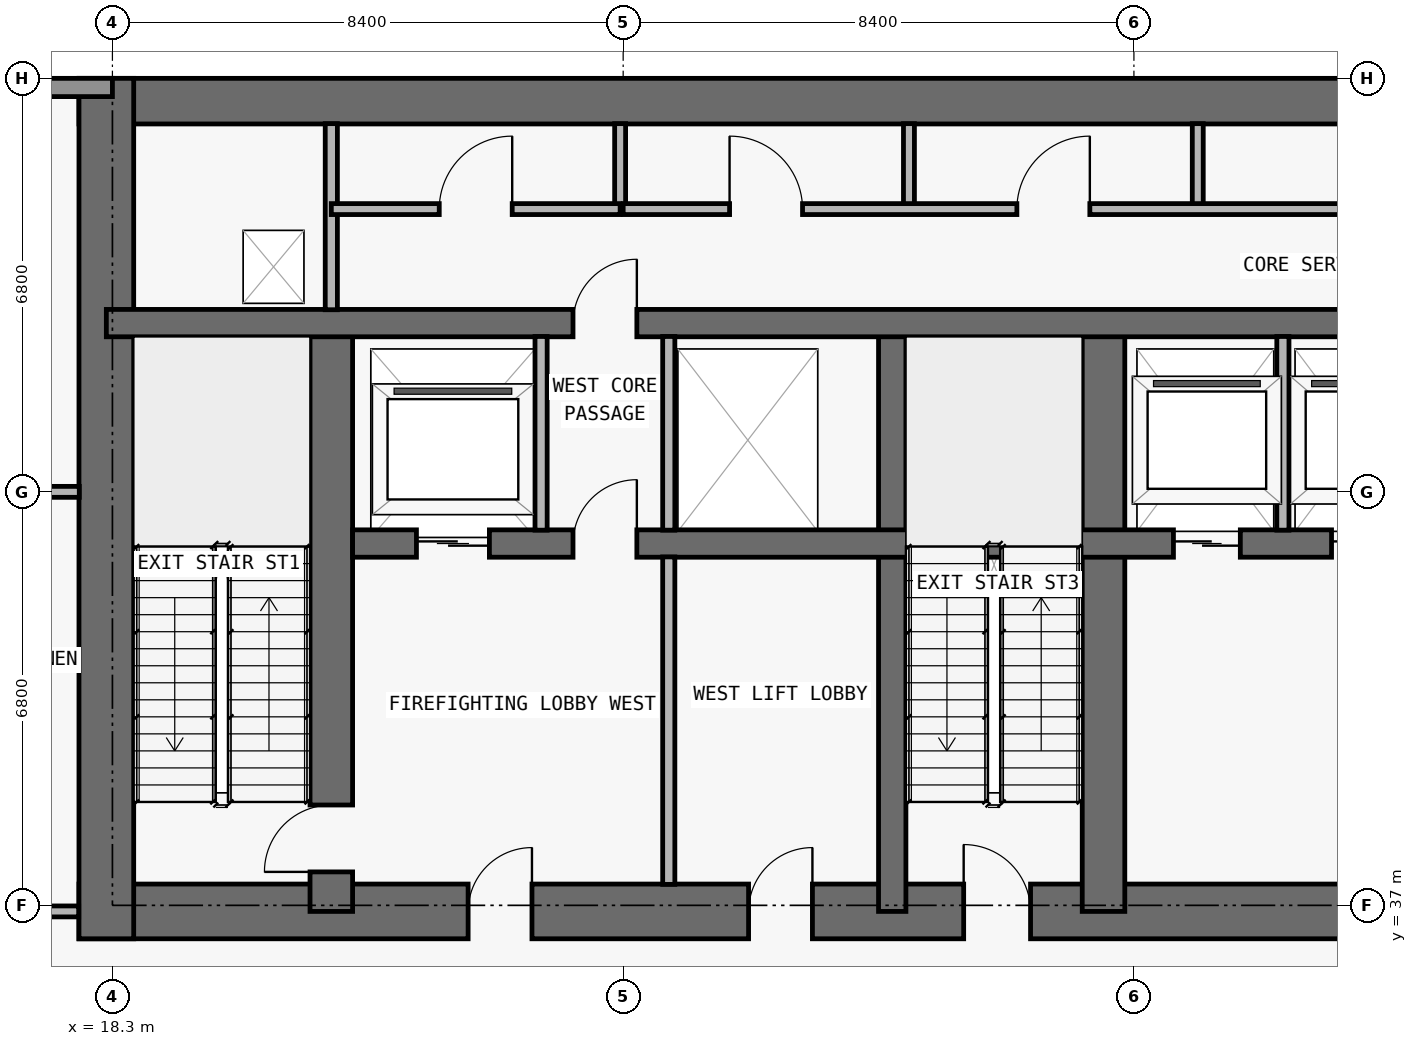
"""IFC4 building model, lengths in metres.
Left out: names, types, materials, properties, quantities, classifications, styles, units other than length and angle.
Written with IfcOpenShell. Run it as: python <this file> out.ifc"""

import sys

from ifc_helpers import new_model, si_unit, direction, frame, frame_2d, origin, place, context, subcontext, project, spatial, rectangle, extrude, element, fill, save


model = new_model("IFC4")
c1 = context("Model", 3, precision=1e-05, world=origin(), true_north=direction((0.0, 1.0)))
c2 = subcontext(c1, "Body", "Model", "MODEL_VIEW")
j1 = project(units=[si_unit("LENGTHUNIT", "METRE"), si_unit("PLANEANGLEUNIT", "RADIAN")], contexts=[c1])
p1 = place(None, origin())
s1 = spatial("IfcSite", under=j1, at=p1, CompositionType="ELEMENT")
p2 = place(p1, origin())
s2 = spatial("IfcBuilding", under=s1, at=p2, CompositionType="ELEMENT")
p3 = place(p2, frame((0.0, 0.0, 24.6)))
s3 = spatial("IfcBuildingStorey", under=s2, at=p3, CompositionType="ELEMENT", Elevation=24.6)
p4 = place(p3, frame((17.75, 36.9, 0.0), z_axis=(0.0, 0.0, 1.0), x_axis=(1.0, 0.0, 0.0)))
e1 = element("IfcWall", 1, at=p4, inside=s3, PredefinedType="SHEAR", context=c2, shape_type="SweptSolid", body=[
    extrude(rectangle(XDim=42.3, YDim=0.9, at=frame_2d((21.15, 0.0))), origin(), (0.0, 0.0, 1.0), 5.15),
])
p5 = place(p4, frame((14.55, 0.0, 0.0)))
e2 = element("IfcOpeningElement", 2, at=p5, cuts=e1, PredefinedType="OPENING", context=c2, shape_type="SweptSolid", body=[
    extrude(rectangle(XDim=1.1, YDim=2.15, at=frame_2d((0.55, 1.075))), frame((0.0, 0.46, 0.0), z_axis=(0.0, -1.0, 0.0), x_axis=(1.0, 0.0, 0.0)), (0.0, 0.0, 1.0), 0.92),
])
p6 = place(p4, frame((6.4, 0.0, 0.0)))
e3 = element("IfcOpeningElement", 3, at=p6, cuts=e1, PredefinedType="OPENING", context=c2, shape_type="SweptSolid", body=[
    extrude(rectangle(XDim=1.05, YDim=2.15, at=frame_2d((0.525, 1.075))), frame((0.0, 0.46, 0.0), z_axis=(0.0, -1.0, 0.0), x_axis=(1.0, 0.0, 0.0)), (0.0, 0.0, 1.0), 0.92),
])
p7 = place(p4, frame((34.9, 0.0, 0.0)))
e4 = element("IfcOpeningElement", 4, at=p7, cuts=e1, PredefinedType="OPENING", context=c2, shape_type="SweptSolid", body=[
    extrude(rectangle(XDim=1.05, YDim=2.15, at=frame_2d((0.525, 1.075))), frame((0.0, 0.46, 0.0), z_axis=(0.0, -1.0, 0.0), x_axis=(1.0, 0.0, 0.0)), (0.0, 0.0, 1.0), 0.92),
])
p8 = place(p4, frame((11.012, 0.0, 0.0)))
e5 = element("IfcOpeningElement", 5, at=p8, cuts=e1, PredefinedType="OPENING", context=c2, shape_type="SweptSolid", body=[
    extrude(rectangle(XDim=1.05, YDim=2.15, at=frame_2d((0.525, 1.075))), frame((0.0, 0.46, 0.0), z_axis=(0.0, -1.0, 0.0), x_axis=(1.0, 0.0, 0.0)), (0.0, 0.0, 1.0), 0.92),
])
p9 = place(p4, frame((24.25, 0.0, 0.0)))
e6 = element("IfcOpeningElement", 6, at=p9, cuts=e1, PredefinedType="OPENING", context=c2, shape_type="SweptSolid", body=[
    extrude(rectangle(XDim=1.05, YDim=2.15, at=frame_2d((0.525, 1.075))), frame((0.0, 0.46, 0.0), z_axis=(0.0, -1.0, 0.0), x_axis=(1.0, 0.0, 0.0)), (0.0, 0.0, 1.0), 0.92),
])
p10 = place(p3, frame((17.75, 50.225, 0.0), z_axis=(0.0, 0.0, 1.0), x_axis=(1.0, 0.0, 0.0)))
e7 = element("IfcWall", 7, at=p10, inside=s3, PredefinedType="SHEAR", context=c2, shape_type="SweptSolid", body=[
    extrude(rectangle(XDim=42.3, YDim=0.75, at=frame_2d((21.15, 0.0))), origin(), (0.0, 0.0, 1.0), 5.15),
])
p11 = place(p3, frame((18.2, 36.45, 0.0), z_axis=(0.0, 0.0, 1.0), x_axis=(0.0, 1.0, 0.0)))
e8 = element("IfcWall", 8, at=p11, inside=s3, PredefinedType="SHEAR", context=c2, shape_type="SweptSolid", body=[
    extrude(rectangle(XDim=14.15, YDim=0.9, at=frame_2d((7.075, 0.0))), origin(), (0.0, 0.0, 1.0), 5.15),
])
p12 = place(p3, frame((21.9, 36.9, 0.0), z_axis=(0.0, 0.0, 1.0), x_axis=(0.0, 1.0, 0.0)))
e9 = element("IfcWall", 9, at=p12, inside=s3, PredefinedType="SHEAR", context=c2, shape_type="SweptSolid", body=[
    extrude(rectangle(XDim=9.675, YDim=0.7, at=frame_2d((4.837, 0.0))), origin(), (0.0, 0.0, 1.0), 5.15),
])
p13 = place(p12, frame((0.65, 0.0, 0.0)))
e10 = element("IfcOpeningElement", 10, at=p13, cuts=e9, PredefinedType="OPENING", context=c2, shape_type="SweptSolid", body=[
    extrude(rectangle(XDim=1.1, YDim=2.15, at=frame_2d((0.55, 1.075))), frame((0.0, 0.36, 0.0), z_axis=(0.0, -1.0, 0.0), x_axis=(1.0, 0.0, 0.0)), (0.0, 0.0, 1.0), 0.72),
])
p14 = place(p3, frame((31.125, 36.9, 0.0), z_axis=(0.0, 0.0, 1.0), x_axis=(0.0, 1.0, 0.0)))
e11 = element("IfcWall", 11, at=p14, inside=s3, PredefinedType="SHEAR", context=c2, shape_type="SweptSolid", body=[
    extrude(rectangle(XDim=9.675, YDim=0.45, at=frame_2d((4.837, 0.0))), origin(), (0.0, 0.0, 1.0), 5.15),
])
p15 = place(p3, frame((34.6, 36.9, 0.0), z_axis=(0.0, 0.0, 1.0), x_axis=(0.0, 1.0, 0.0)))
e12 = element("IfcWall", 12, at=p15, inside=s3, PredefinedType="SHEAR", context=c2, shape_type="SweptSolid", body=[
    extrude(rectangle(XDim=9.675, YDim=0.7, at=frame_2d((4.837, 0.0))), origin(), (0.0, 0.0, 1.0), 5.15),
])
p16 = place(p3, frame((22.25, 42.95, 0.0), z_axis=(0.0, 0.0, 1.0), x_axis=(1.0, 0.0, 0.0)))
e13 = element("IfcWall", 13, at=p16, inside=s3, PredefinedType="SHEAR", context=c2, shape_type="SweptSolid", body=[
    extrude(rectangle(XDim=33.3, YDim=0.45, at=frame_2d((16.65, 0.0))), origin(), (0.0, 0.0, 1.0), 5.15),
])
p17 = place(p16, frame((1.05, 0.0, 0.0)))
e14 = element("IfcOpeningElement", 14, at=p17, cuts=e13, PredefinedType="OPENING", context=c2, shape_type="SweptSolid", body=[
    extrude(rectangle(XDim=1.2, YDim=2.2, at=frame_2d((0.6, 1.1))), frame((0.0, 0.235, 0.0), z_axis=(0.0, -1.0, 0.0), x_axis=(1.0, 0.0, 0.0)), (0.0, 0.0, 1.0), 0.47),
])
p18 = place(p16, frame((31.05, 0.0, 0.0)))
e15 = element("IfcOpeningElement", 15, at=p18, cuts=e13, PredefinedType="OPENING", context=c2, shape_type="SweptSolid", body=[
    extrude(rectangle(XDim=1.2, YDim=2.2, at=frame_2d((0.6, 1.1))), frame((0.0, 0.235, 0.0), z_axis=(0.0, -1.0, 0.0), x_axis=(1.0, 0.0, 0.0)), (0.0, 0.0, 1.0), 0.47),
])
p19 = place(p16, frame((13.5, 0.0, 0.0)))
e16 = element("IfcOpeningElement", 16, at=p19, cuts=e13, PredefinedType="OPENING", context=c2, shape_type="SweptSolid", body=[
    extrude(rectangle(XDim=1.1, YDim=2.2, at=frame_2d((0.55, 1.1))), frame((0.0, 0.235, 0.0), z_axis=(0.0, -1.0, 0.0), x_axis=(1.0, 0.0, 0.0)), (0.0, 0.0, 1.0), 0.47),
])
p20 = place(p16, frame((16.1, 0.0, 0.0)))
e17 = element("IfcOpeningElement", 17, at=p20, cuts=e13, PredefinedType="OPENING", context=c2, shape_type="SweptSolid", body=[
    extrude(rectangle(XDim=1.1, YDim=2.2, at=frame_2d((0.55, 1.1))), frame((0.0, 0.235, 0.0), z_axis=(0.0, -1.0, 0.0), x_axis=(1.0, 0.0, 0.0)), (0.0, 0.0, 1.0), 0.47),
])
p21 = place(p16, frame((18.7, 0.0, 0.0)))
e18 = element("IfcOpeningElement", 18, at=p21, cuts=e13, PredefinedType="OPENING", context=c2, shape_type="SweptSolid", body=[
    extrude(rectangle(XDim=1.1, YDim=2.2, at=frame_2d((0.55, 1.1))), frame((0.0, 0.235, 0.0), z_axis=(0.0, -1.0, 0.0), x_axis=(1.0, 0.0, 0.0)), (0.0, 0.0, 1.0), 0.47),
])
p22 = place(p16, frame((3.625, 0.0, 0.0)))
e19 = element("IfcOpeningElement", 19, at=p22, cuts=e13, PredefinedType="OPENING", context=c2, shape_type="SweptSolid", body=[
    extrude(rectangle(XDim=1.05, YDim=2.15, at=frame_2d((0.525, 1.075))), frame((0.0, 0.235, 0.0), z_axis=(0.0, -1.0, 0.0), x_axis=(1.0, 0.0, 0.0)), (0.0, 0.0, 1.0), 0.47),
])
p23 = place(p16, frame((28.675, 0.0, 0.0)))
e20 = element("IfcOpeningElement", 20, at=p23, cuts=e13, PredefinedType="OPENING", context=c2, shape_type="SweptSolid", body=[
    extrude(rectangle(XDim=1.05, YDim=2.15, at=frame_2d((0.525, 1.075))), frame((0.0, 0.235, 0.0), z_axis=(0.0, -1.0, 0.0), x_axis=(1.0, 0.0, 0.0)), (0.0, 0.0, 1.0), 0.47),
])
p24 = place(p3, frame((18.2, 46.575, 0.0), z_axis=(0.0, 0.0, 1.0), x_axis=(1.0, 0.0, 0.0)))
e21 = element("IfcWall", 21, at=p24, inside=s3, PredefinedType="SHEAR", context=c2, shape_type="SweptSolid", body=[
    extrude(rectangle(XDim=41.4, YDim=0.45, at=frame_2d((20.7, 0.0))), origin(), (0.0, 0.0, 1.0), 5.15),
])
p25 = place(p24, frame((7.675, 0.0, 0.0)))
e22 = element("IfcOpeningElement", 22, at=p25, cuts=e21, PredefinedType="OPENING", context=c2, shape_type="SweptSolid", body=[
    extrude(rectangle(XDim=1.05, YDim=2.15, at=frame_2d((0.525, 1.075))), frame((0.0, 0.235, 0.0), z_axis=(0.0, -1.0, 0.0), x_axis=(1.0, 0.0, 0.0)), (0.0, 0.0, 1.0), 0.47),
])
p26 = place(p24, frame((32.725, 0.0, 0.0)))
e23 = element("IfcOpeningElement", 23, at=p26, cuts=e21, PredefinedType="OPENING", context=c2, shape_type="SweptSolid", body=[
    extrude(rectangle(XDim=1.05, YDim=2.15, at=frame_2d((0.525, 1.075))), frame((0.0, 0.235, 0.0), z_axis=(0.0, -1.0, 0.0), x_axis=(1.0, 0.0, 0.0)), (0.0, 0.0, 1.0), 0.47),
])
p27 = place(p3, frame((5.1, 50.45, 0.0), z_axis=(0.0, 0.0, 1.0), x_axis=(1.0, 0.0, 0.0)))
e24 = element("IfcWall", 24, at=p27, inside=s3, PredefinedType="STANDARD", context=c2, shape_type="SweptSolid", body=[
    extrude(rectangle(XDim=13.2, YDim=0.3, at=frame_2d((6.6, 0.0))), origin(), (0.0, 0.0, 1.0), 5.15),
])
p28 = place(p27, frame((5.5, 0.0, 0.85)))
e25 = element("IfcOpeningElement", 25, at=p28, cuts=e24, PredefinedType="OPENING", context=c2, shape_type="SweptSolid", body=[
    extrude(rectangle(XDim=2.2, YDim=1.55, at=frame_2d((1.1, 0.775))), frame((0.0, 0.16, 0.0), z_axis=(0.0, -1.0, 0.0), x_axis=(1.0, 0.0, 0.0)), (0.0, 0.0, 1.0), 0.32),
])
p29 = place(p3, frame((21.9, 46.795, 0.0), z_axis=(0.0, 0.0, 1.0), x_axis=(0.0, 1.0, 0.0)))
e26 = element("IfcWall", 26, at=p29, inside=s3, PredefinedType="PARTITIONING", context=c2, shape_type="SweptSolid", body=[
    extrude(rectangle(XDim=3.06, YDim=0.2, at=frame_2d((1.53, 0.0))), origin(), (0.0, 0.0, 1.0), 5.15),
])
p30 = place(p3, frame((25.35, 43.17, 0.0), z_axis=(0.0, 0.0, 1.0), x_axis=(0.0, 1.0, 0.0)))
e27 = element("IfcWall", 27, at=p30, inside=s3, PredefinedType="PARTITIONING", context=c2, shape_type="SweptSolid", body=[
    extrude(rectangle(XDim=3.185, YDim=0.2, at=frame_2d((1.593, 0.0))), origin(), (0.0, 0.0, 1.0), 5.15),
])
p31 = place(p3, frame((26.65, 48.45, 0.0), z_axis=(0.0, 0.0, 1.0), x_axis=(0.0, 1.0, 0.0)))
e28 = element("IfcWall", 28, at=p31, inside=s3, PredefinedType="PARTITIONING", context=c2, shape_type="SweptSolid", body=[
    extrude(rectangle(XDim=1.405, YDim=0.18, at=frame_2d((0.703, 0.0))), origin(), (0.0, 0.0, 1.0), 5.15),
])
p32 = place(p3, frame((27.45, 37.345, 0.0), z_axis=(0.0, 0.0, 1.0), x_axis=(0.0, 1.0, 0.0)))
e29 = element("IfcWall", 29, at=p32, inside=s3, PredefinedType="PARTITIONING", context=c2, shape_type="SweptSolid", body=[
    extrude(rectangle(XDim=5.385, YDim=0.2, at=frame_2d((2.692, 0.0))), origin(), (0.0, 0.0, 1.0), 5.15),
])
p33 = place(p3, frame((27.45, 43.17, 0.0), z_axis=(0.0, 0.0, 1.0), x_axis=(0.0, 1.0, 0.0)))
e30 = element("IfcWall", 30, at=p33, inside=s3, PredefinedType="PARTITIONING", context=c2, shape_type="SweptSolid", body=[
    extrude(rectangle(XDim=3.185, YDim=0.2, at=frame_2d((1.593, 0.0))), origin(), (0.0, 0.0, 1.0), 5.15),
])
for number, where, z_axis, x_axis in (
    (31, (31.4, 48.45, 0.0), (0.0, 0.0, 1.0), (0.0, 1.0, 0.0)),
    (32, (36.15, 48.45, 0.0), (0.0, 0.0, 1.0), (0.0, 1.0, 0.0)),
):
    element("IfcWall", number, at=place(p3, frame(where, z_axis=z_axis, x_axis=x_axis)), inside=s3, PredefinedType="PARTITIONING", context=c2, shape_type="SweptSolid", body=[
        extrude(rectangle(XDim=1.405, YDim=0.18, at=frame_2d((0.703, 0.0))), origin(), (0.0, 0.0, 1.0), 5.15),
    ])
p34 = place(p3, frame((37.55, 43.17, 0.0), z_axis=(0.0, 0.0, 1.0), x_axis=(0.0, 1.0, 0.0)))
e33 = element("IfcWall", 33, at=p34, inside=s3, PredefinedType="PARTITIONING", context=c2, shape_type="SweptSolid", body=[
    extrude(rectangle(XDim=3.185, YDim=0.2, at=frame_2d((1.593, 0.0))), origin(), (0.0, 0.0, 1.0), 5.15),
])
p35 = place(p3, frame((5.1, 36.9, 0.0), z_axis=(0.0, 0.0, 1.0), x_axis=(1.0, 0.0, 0.0)))
e34 = element("IfcWall", 34, at=p35, inside=s3, PredefinedType="PARTITIONING", context=c2, shape_type="SweptSolid", body=[
    extrude(rectangle(XDim=12.645, YDim=0.18, at=frame_2d((6.323, 0.0))), origin(), (0.0, 0.0, 1.0), 5.15),
])
p36 = place(p35, frame((1.975, 0.0, 0.0)))
e35 = element("IfcOpeningElement", 35, at=p36, cuts=e34, PredefinedType="OPENING", context=c2, shape_type="SweptSolid", body=[
    extrude(rectangle(XDim=0.85, YDim=2.1, at=frame_2d((0.425, 1.05))), frame((0.0, 0.1, 0.0), z_axis=(0.0, -1.0, 0.0), x_axis=(1.0, 0.0, 0.0)), (0.0, 0.0, 1.0), 0.2),
])
p37 = place(p35, frame((6.525, 0.0, 0.0)))
e36 = element("IfcOpeningElement", 36, at=p37, cuts=e34, PredefinedType="OPENING", context=c2, shape_type="SweptSolid", body=[
    extrude(rectangle(XDim=0.85, YDim=2.1, at=frame_2d((0.425, 1.05))), frame((0.0, 0.1, 0.0), z_axis=(0.0, -1.0, 0.0), x_axis=(1.0, 0.0, 0.0)), (0.0, 0.0, 1.0), 0.2),
])
p38 = place(p35, frame((10.423, 0.0, 0.0)))
e37 = element("IfcOpeningElement", 37, at=p38, cuts=e34, PredefinedType="OPENING", context=c2, shape_type="SweptSolid", body=[
    extrude(rectangle(XDim=0.9, YDim=2.15, at=frame_2d((0.45, 1.075))), frame((0.0, 0.1, 0.0), z_axis=(0.0, -1.0, 0.0), x_axis=(1.0, 0.0, 0.0)), (0.0, 0.0, 1.0), 0.2),
])
p39 = place(p3, frame((5.1, 43.8, 0.0), z_axis=(0.0, 0.0, 1.0), x_axis=(1.0, 0.0, 0.0)))
e38 = element("IfcWall", 38, at=p39, inside=s3, PredefinedType="PARTITIONING", context=c2, shape_type="SweptSolid", body=[
    extrude(rectangle(XDim=12.655, YDim=0.18, at=frame_2d((6.327, 0.0))), origin(), (0.0, 0.0, 1.0), 4.439),
])
p40 = place(p39, frame((10.278, 0.0, 0.0)))
e39 = element("IfcOpeningElement", 39, at=p40, cuts=e38, PredefinedType="OPENING", context=c2, shape_type="SweptSolid", body=[
    extrude(rectangle(XDim=1.2, YDim=2.2, at=frame_2d((0.6, 1.1))), frame((0.0, 0.1, 0.0), z_axis=(0.0, -1.0, 0.0), x_axis=(1.0, 0.0, 0.0)), (0.0, 0.0, 1.0), 0.2),
])
p41 = place(p3, frame((21.9, 48.45, 0.0), z_axis=(0.0, 0.0, 1.0), x_axis=(1.0, 0.0, 0.0)))
e40 = element("IfcWall", 40, at=p41, inside=s3, PredefinedType="PARTITIONING", context=c2, shape_type="SweptSolid", body=[
    extrude(rectangle(XDim=4.75, YDim=0.18, at=frame_2d((2.375, 0.0))), origin(), (0.0, 0.0, 1.0), 5.15),
])
p42 = place(p41, frame((1.775, 0.0, 0.0)))
e41 = element("IfcOpeningElement", 41, at=p42, cuts=e40, PredefinedType="OPENING", context=c2, shape_type="SweptSolid", body=[
    extrude(rectangle(XDim=1.2, YDim=2.2, at=frame_2d((0.6, 1.1))), frame((0.0, 0.1, 0.0), z_axis=(0.0, -1.0, 0.0), x_axis=(1.0, 0.0, 0.0)), (0.0, 0.0, 1.0), 0.2),
])
p43 = place(p3, frame((26.7, 48.45, 0.0), z_axis=(0.0, 0.0, 1.0), x_axis=(1.0, 0.0, 0.0)))
e42 = element("IfcWall", 42, at=p43, inside=s3, PredefinedType="PARTITIONING", context=c2, shape_type="SweptSolid", body=[
    extrude(rectangle(XDim=29.2, YDim=0.18, at=frame_2d((14.6, 0.0))), origin(), (0.0, 0.0, 1.0), 5.15),
])
p44 = place(p43, frame((1.75, 0.0, 0.0)))
e43 = element("IfcOpeningElement", 43, at=p44, cuts=e42, PredefinedType="OPENING", context=c2, shape_type="SweptSolid", body=[
    extrude(rectangle(XDim=1.2, YDim=2.2, at=frame_2d((0.6, 1.1))), frame((0.0, 0.1, 0.0), z_axis=(0.0, -1.0, 0.0), x_axis=(1.0, 0.0, 0.0)), (0.0, 0.0, 1.0), 0.2),
])
p45 = place(p43, frame((6.475, 0.0, 0.0)))
e44 = element("IfcOpeningElement", 44, at=p45, cuts=e42, PredefinedType="OPENING", context=c2, shape_type="SweptSolid", body=[
    extrude(rectangle(XDim=1.2, YDim=2.2, at=frame_2d((0.6, 1.1))), frame((0.0, 0.1, 0.0), z_axis=(0.0, -1.0, 0.0), x_axis=(1.0, 0.0, 0.0)), (0.0, 0.0, 1.0), 0.2),
])
p46 = place(p43, frame((14.05, 0.0, 0.0)))
e45 = element("IfcOpeningElement", 45, at=p46, cuts=e42, PredefinedType="OPENING", context=c2, shape_type="SweptSolid", body=[
    extrude(rectangle(XDim=1.0, YDim=2.2, at=frame_2d((0.5, 1.1))), frame((0.0, 0.1, 0.0), z_axis=(0.0, -1.0, 0.0), x_axis=(1.0, 0.0, 0.0)), (0.0, 0.0, 1.0), 0.2),
])
p47 = place(p43, frame((21.425, 0.0, 0.0)))
e46 = element("IfcOpeningElement", 46, at=p47, cuts=e42, PredefinedType="OPENING", context=c2, shape_type="SweptSolid", body=[
    extrude(rectangle(XDim=1.2, YDim=2.2, at=frame_2d((0.6, 1.1))), frame((0.0, 0.1, 0.0), z_axis=(0.0, -1.0, 0.0), x_axis=(1.0, 0.0, 0.0)), (0.0, 0.0, 1.0), 0.2),
])
p48 = place(p43, frame((26.375, 0.0, 0.0)))
e47 = element("IfcOpeningElement", 47, at=p48, cuts=e42, PredefinedType="OPENING", context=c2, shape_type="SweptSolid", body=[
    extrude(rectangle(XDim=0.85, YDim=2.1, at=frame_2d((0.425, 1.05))), frame((0.0, 0.1, 0.0), z_axis=(0.0, -1.0, 0.0), x_axis=(1.0, 0.0, 0.0)), (0.0, 0.0, 1.0), 0.2),
])
p49 = place(p17, origin())
e48 = element("IfcDoor", 48, at=p49, inside=s3, OperationType="DOUBLE_DOOR_SLIDING", PredefinedType="DOOR", context=c2, shape_type="SweptSolid", body=[
    extrude(rectangle(XDim=1.2, YDim=2.2, at=frame_2d((0.6, 1.1))), frame((0.0, 0.025, 0.0), z_axis=(0.0, -1.0, 0.0), x_axis=(1.0, 0.0, 0.0)), (0.0, 0.0, 1.0), 0.05),
])
fill(e14, e48)
p50 = place(p19, origin())
e49 = element("IfcDoor", 49, at=p50, inside=s3, OperationType="DOUBLE_DOOR_SLIDING", PredefinedType="DOOR", context=c2, shape_type="SweptSolid", body=[
    extrude(rectangle(XDim=1.1, YDim=2.2, at=frame_2d((0.55, 1.1))), frame((0.0, 0.025, 0.0), z_axis=(0.0, -1.0, 0.0), x_axis=(1.0, 0.0, 0.0)), (0.0, 0.0, 1.0), 0.05),
])
fill(e16, e49)
p51 = place(p20, origin())
e50 = element("IfcDoor", 50, at=p51, inside=s3, OperationType="DOUBLE_DOOR_SLIDING", PredefinedType="DOOR", context=c2, shape_type="SweptSolid", body=[
    extrude(rectangle(XDim=1.1, YDim=2.2, at=frame_2d((0.55, 1.1))), frame((0.0, 0.025, 0.0), z_axis=(0.0, -1.0, 0.0), x_axis=(1.0, 0.0, 0.0)), (0.0, 0.0, 1.0), 0.05),
])
fill(e17, e50)
p52 = place(p5, origin())
e51 = element("IfcDoor", 51, at=p52, inside=s3, OperationType="SINGLE_SWING_LEFT", PredefinedType="DOOR", context=c2, shape_type="SweptSolid", body=[
    extrude(rectangle(XDim=1.1, YDim=2.15, at=frame_2d((0.55, 1.075))), frame((0.0, 0.025, 0.0), z_axis=(0.0, -1.0, 0.0), x_axis=(1.0, 0.0, 0.0)), (0.0, 0.0, 1.0), 0.05),
])
fill(e2, e51)
p53 = place(p6, origin())
e52 = element("IfcDoor", 52, at=p53, inside=s3, OperationType="SINGLE_SWING_RIGHT", PredefinedType="DOOR", context=c2, shape_type="SweptSolid", body=[
    extrude(rectangle(XDim=1.05, YDim=2.15, at=frame_2d((0.525, 1.075))), frame((0.0, 0.025, 0.0), z_axis=(0.0, -1.0, 0.0), x_axis=(1.0, 0.0, 0.0)), (0.0, 0.0, 1.0), 0.05),
])
fill(e3, e52)
p54 = place(p13, origin())
e53 = element("IfcDoor", 53, at=p54, inside=s3, OperationType="SINGLE_SWING_LEFT", PredefinedType="DOOR", context=c2, shape_type="SweptSolid", body=[
    extrude(rectangle(XDim=1.1, YDim=2.15, at=frame_2d((0.55, 1.075))), frame((0.0, 0.025, 0.0), z_axis=(0.0, -1.0, 0.0), x_axis=(1.0, 0.0, 0.0)), (0.0, 0.0, 1.0), 0.05),
])
fill(e10, e53)
p55 = place(p22, origin())
e54 = element("IfcDoor", 54, at=p55, inside=s3, OperationType="SINGLE_SWING_RIGHT", PredefinedType="DOOR", context=c2, shape_type="SweptSolid", body=[
    extrude(rectangle(XDim=1.05, YDim=2.15, at=frame_2d((0.525, 1.075))), frame((0.0, 0.025, 0.0), z_axis=(0.0, -1.0, 0.0), x_axis=(1.0, 0.0, 0.0)), (0.0, 0.0, 1.0), 0.05),
])
fill(e19, e54)
p56 = place(p8, origin())
e55 = element("IfcDoor", 55, at=p56, inside=s3, OperationType="SINGLE_SWING_RIGHT", PredefinedType="DOOR", context=c2, shape_type="SweptSolid", body=[
    extrude(rectangle(XDim=1.05, YDim=2.15, at=frame_2d((0.525, 1.075))), frame((0.0, 0.025, 0.0), z_axis=(0.0, -1.0, 0.0), x_axis=(1.0, 0.0, 0.0)), (0.0, 0.0, 1.0), 0.05),
])
fill(e5, e55)
p57 = place(p25, origin())
e56 = element("IfcDoor", 56, at=p57, inside=s3, OperationType="SINGLE_SWING_RIGHT", PredefinedType="DOOR", context=c2, shape_type="SweptSolid", body=[
    extrude(rectangle(XDim=1.05, YDim=2.15, at=frame_2d((0.525, 1.075))), frame((0.0, 0.025, 0.0), z_axis=(0.0, -1.0, 0.0), x_axis=(1.0, 0.0, 0.0)), (0.0, 0.0, 1.0), 0.05),
])
fill(e22, e56)
p58 = place(p42, origin())
e57 = element("IfcDoor", 57, at=p58, inside=s3, OperationType="SINGLE_SWING_RIGHT", PredefinedType="DOOR", context=c2, shape_type="SweptSolid", body=[
    extrude(rectangle(XDim=1.2, YDim=2.2, at=frame_2d((0.6, 1.1))), frame((0.0, 0.025, 0.0), z_axis=(0.0, -1.0, 0.0), x_axis=(1.0, 0.0, 0.0)), (0.0, 0.0, 1.0), 0.05),
])
fill(e41, e57)
p59 = place(p44, origin())
e58 = element("IfcDoor", 58, at=p59, inside=s3, OperationType="SINGLE_SWING_LEFT", PredefinedType="DOOR", context=c2, shape_type="SweptSolid", body=[
    extrude(rectangle(XDim=1.2, YDim=2.2, at=frame_2d((0.6, 1.1))), frame((0.0, 0.025, 0.0), z_axis=(0.0, -1.0, 0.0), x_axis=(1.0, 0.0, 0.0)), (0.0, 0.0, 1.0), 0.05),
])
fill(e43, e58)
p60 = place(p45, origin())
e59 = element("IfcDoor", 59, at=p60, inside=s3, OperationType="SINGLE_SWING_RIGHT", PredefinedType="DOOR", context=c2, shape_type="SweptSolid", body=[
    extrude(rectangle(XDim=1.2, YDim=2.2, at=frame_2d((0.6, 1.1))), frame((0.0, 0.025, 0.0), z_axis=(0.0, -1.0, 0.0), x_axis=(1.0, 0.0, 0.0)), (0.0, 0.0, 1.0), 0.05),
])
fill(e44, e59)
save(model, sys.argv[1])
